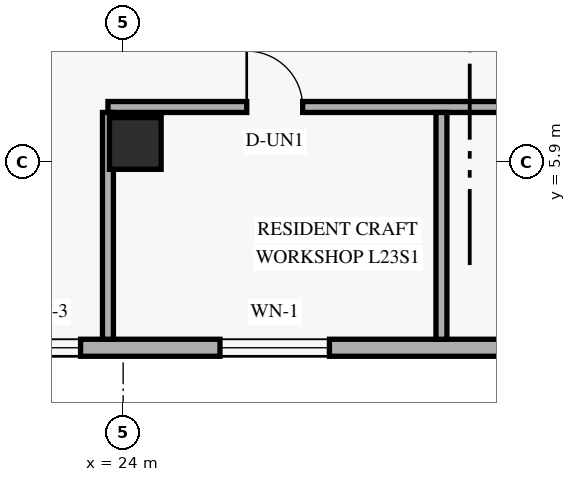
"""IFC4 building model, lengths in metres.
Left out: names, types, materials, properties, quantities, classifications, styles, units other than length and angle.
Written with IfcOpenShell. Run it as: python <this file> out.ifc"""

import sys

from ifc_helpers import new_model, si_unit, direction, frame, frame_2d, origin, origin_2d, place, context, subcontext, project, spatial, rectangle, extrude, element, fill, save


model = new_model("IFC4")
c1 = context("Model", 3, precision=1e-05, world=origin(), true_north=direction((0.0, 1.0)))
c2 = subcontext(c1, "Body", "Model", "MODEL_VIEW")
j1 = project(units=[si_unit("LENGTHUNIT", "METRE"), si_unit("PLANEANGLEUNIT", "RADIAN")], contexts=[c1])
p1 = place(None, origin())
s1 = spatial("IfcSite", under=j1, at=p1, CompositionType="ELEMENT")
p2 = place(p1, origin())
s2 = spatial("IfcBuilding", under=s1, at=p2, CompositionType="ELEMENT")
p3 = place(p2, frame((0.0, 0.0, 91.2)))
s3 = spatial("IfcBuildingStorey", under=s2, at=p3, CompositionType="ELEMENT", Elevation=91.2)
p4 = place(p3, frame((24.2, 6.2, 0.0), z_axis=(0.0, 0.0, 1.0), x_axis=(1.0, 0.0, 0.0)))
e1 = element("IfcColumn", 1, at=p4, inside=s3, PredefinedType="COLUMN", context=c2, shape_type="SweptSolid", body=[
    extrude(rectangle(XDim=0.85, YDim=0.85, at=origin_2d()), origin(), (0.0, 0.0, 1.0), 3.6),
])
p5 = place(p3, frame((13.42, 2.84, 0.0), z_axis=(0.0, 0.0, 1.0), x_axis=(1.0, 0.0, 0.0)))
e2 = element("IfcWall", 2, at=p5, inside=s3, PredefinedType="SOLIDWALL", context=c2, shape_type="SweptSolid", body=[
    extrude(rectangle(XDim=36.56, YDim=0.28, at=frame_2d((18.28, 0.0))), origin(), (0.0, 0.0, 1.0), 3.36),
])
p6 = place(p5, frame((3.215, 0.0, 0.85)))
e3 = element("IfcOpeningElement", 3, at=p6, cuts=e2, PredefinedType="OPENING", context=c2, shape_type="SweptSolid", body=[
    extrude(rectangle(XDim=1.8, YDim=1.6, at=frame_2d((0.9, 0.8))), frame((0.0, 0.15, 0.0), z_axis=(0.0, -1.0, 0.0), x_axis=(1.0, 0.0, 0.0)), (0.0, 0.0, 1.0), 0.3),
])
p7 = place(p5, frame((8.68, 0.0, 0.85)))
e4 = element("IfcOpeningElement", 4, at=p7, cuts=e2, PredefinedType="OPENING", context=c2, shape_type="SweptSolid", body=[
    extrude(rectangle(XDim=1.2, YDim=1.5, at=frame_2d((0.6, 0.75))), frame((0.0, 0.15, 0.0), z_axis=(0.0, -1.0, 0.0), x_axis=(1.0, 0.0, 0.0)), (0.0, 0.0, 1.0), 0.3),
])
p8 = place(p5, frame((12.172, 0.0, 0.85)))
e5 = element("IfcOpeningElement", 5, at=p8, cuts=e2, PredefinedType="OPENING", context=c2, shape_type="SweptSolid", body=[
    extrude(rectangle(XDim=1.8, YDim=1.6, at=frame_2d((0.9, 0.8))), frame((0.0, 0.15, 0.0), z_axis=(0.0, -1.0, 0.0), x_axis=(1.0, 0.0, 0.0)), (0.0, 0.0, 1.0), 0.3),
])
p9 = place(p5, frame((18.008, 0.0, 0.85)))
e6 = element("IfcOpeningElement", 6, at=p9, cuts=e2, PredefinedType="OPENING", context=c2, shape_type="SweptSolid", body=[
    extrude(rectangle(XDim=1.8, YDim=1.6, at=frame_2d((0.9, 0.8))), frame((0.0, 0.15, 0.0), z_axis=(0.0, -1.0, 0.0), x_axis=(1.0, 0.0, 0.0)), (0.0, 0.0, 1.0), 0.3),
])
p10 = place(p5, frame((22.465, 0.0, 0.85)))
e7 = element("IfcOpeningElement", 7, at=p10, cuts=e2, PredefinedType="OPENING", context=c2, shape_type="SweptSolid", body=[
    extrude(rectangle(XDim=1.2, YDim=1.5, at=frame_2d((0.6, 0.75))), frame((0.0, 0.15, 0.0), z_axis=(0.0, -1.0, 0.0), x_axis=(1.0, 0.0, 0.0)), (0.0, 0.0, 1.0), 0.3),
])
p11 = place(p5, frame((29.445, 0.0, 0.85)))
e8 = element("IfcOpeningElement", 8, at=p11, cuts=e2, PredefinedType="OPENING", context=c2, shape_type="SweptSolid", body=[
    extrude(rectangle(XDim=1.8, YDim=1.6, at=frame_2d((0.9, 0.8))), frame((0.0, 0.15, 0.0), z_axis=(0.0, -1.0, 0.0), x_axis=(1.0, 0.0, 0.0)), (0.0, 0.0, 1.0), 0.3),
])
p12 = place(p3, frame((23.75, 6.8, 0.0), z_axis=(0.0, 0.0, 1.0), x_axis=(1.0, 0.0, 0.0)))
e9 = element("IfcWall", 9, at=p12, inside=s3, PredefinedType="STANDARD", context=c2, shape_type="SweptSolid", body=[
    extrude(rectangle(XDim=11.67, YDim=0.18, at=frame_2d((5.835, 0.0))), origin(), (0.0, 0.0, 1.0), 2.731),
])
p13 = place(p12, frame((2.282, 0.0, 0.0)))
e10 = element("IfcOpeningElement", 10, at=p13, cuts=e9, PredefinedType="OPENING", context=c2, shape_type="SweptSolid", body=[
    extrude(rectangle(XDim=0.92, YDim=2.15, at=frame_2d((0.46, 1.075))), frame((0.0, 0.1, 0.0), z_axis=(0.0, -1.0, 0.0), x_axis=(1.0, 0.0, 0.0)), (0.0, 0.0, 1.0), 0.2),
])
p14 = place(p12, frame((8.117, 0.0, 0.0)))
e11 = element("IfcOpeningElement", 11, at=p14, cuts=e9, PredefinedType="OPENING", context=c2, shape_type="SweptSolid", body=[
    extrude(rectangle(XDim=0.92, YDim=2.15, at=frame_2d((0.46, 1.075))), frame((0.0, 0.1, 0.0), z_axis=(0.0, -1.0, 0.0), x_axis=(1.0, 0.0, 0.0)), (0.0, 0.0, 1.0), 0.2),
])
for number, where, z_axis, x_axis in (
    (12, (23.75, 2.98, 0.0), (0.0, 0.0, 1.0), (0.0, 1.0, 0.0)),
    (13, (29.235, 2.98, 0.0), (0.0, 0.0, 1.0), (0.0, 1.0, 0.0)),
):
    element("IfcWall", number, at=place(p3, frame(where, z_axis=z_axis, x_axis=x_axis)), inside=s3, PredefinedType="PARTITIONING", context=c2, shape_type="SweptSolid", body=[
        extrude(rectangle(XDim=3.73, YDim=0.18, at=frame_2d((1.865, 0.0))), origin(), (0.0, 0.0, 1.0), 2.809),
    ])
p15 = place(p7, origin())
e14 = element("IfcWindow", 14, at=p15, inside=s3, PartitioningType="SINGLE_PANEL", PredefinedType="WINDOW", context=c2, shape_type="SweptSolid", body=[
    extrude(rectangle(XDim=1.2, YDim=1.5, at=frame_2d((0.6, 0.75))), frame((0.0, 0.03, 0.0), z_axis=(0.0, -1.0, 0.0), x_axis=(1.0, 0.0, 0.0)), (0.0, 0.0, 1.0), 0.06),
])
fill(e4, e14)
p16 = place(p8, origin())
e15 = element("IfcWindow", 15, at=p16, inside=s3, PartitioningType="SINGLE_PANEL", PredefinedType="WINDOW", context=c2, shape_type="SweptSolid", body=[
    extrude(rectangle(XDim=1.8, YDim=1.6, at=frame_2d((0.9, 0.8))), frame((0.0, 0.03, 0.0), z_axis=(0.0, -1.0, 0.0), x_axis=(1.0, 0.0, 0.0)), (0.0, 0.0, 1.0), 0.06),
])
fill(e5, e15)
p17 = place(p13, origin())
e16 = element("IfcDoor", 16, at=p17, inside=s3, OperationType="SINGLE_SWING_LEFT", PredefinedType="DOOR", context=c2, shape_type="SweptSolid", body=[
    extrude(rectangle(XDim=0.92, YDim=2.15, at=frame_2d((0.46, 1.075))), frame((0.0, 0.025, 0.0), z_axis=(0.0, -1.0, 0.0), x_axis=(1.0, 0.0, 0.0)), (0.0, 0.0, 1.0), 0.05),
])
fill(e10, e16)
save(model, sys.argv[1])
